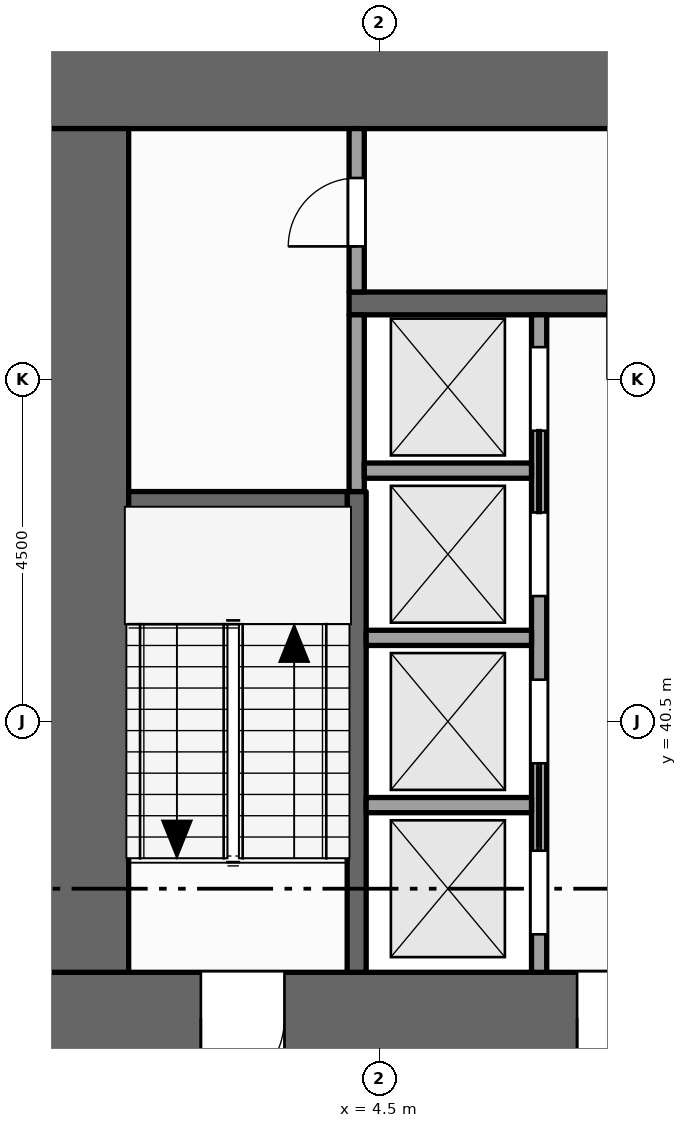
"""IFC4 building model, lengths in metres.
Left out: names, types, materials, properties, quantities, classifications, styles, units other than length and angle.
Written with IfcOpenShell. Run it as: python <this file> out.ifc"""

import sys

from ifc_helpers import new_model, si_unit, direction, frame, frame_2d, origin, place, context, subcontext, project, spatial, rectangle, extrude, element, fill, save


model = new_model("IFC4")
c1 = context("Model", 3, precision=1e-05, world=origin(), true_north=direction((0.0, 1.0)))
c2 = subcontext(c1, "Body", "Model", "MODEL_VIEW")
j1 = project(units=[si_unit("LENGTHUNIT", "METRE"), si_unit("PLANEANGLEUNIT", "RADIAN")], contexts=[c1])
p1 = place(None, origin())
s1 = spatial("IfcSite", under=j1, at=p1, CompositionType="ELEMENT")
p2 = place(p1, origin())
s2 = spatial("IfcBuilding", under=s1, at=p2, CompositionType="ELEMENT")
p3 = place(p2, frame((0.0, 0.0, 41.0)))
s3 = spatial("IfcBuildingStorey", under=s2, at=p3, CompositionType="ELEMENT", Elevation=41.0)
p4 = place(p3, frame((0.0, 36.6, -0.15), z_axis=(0.0, 0.0, 1.0), x_axis=(1.0, 0.0, 0.0)))
e1 = element("IfcWall", 1, at=p4, inside=s3, PredefinedType="SHEAR", context=c2, shape_type="SweptSolid", body=[
    extrude(rectangle(XDim=22.5, YDim=1.2, at=frame_2d((11.25, 0.0))), origin(), (0.0, 0.0, 1.0), 4.0),
])
p5 = place(p4, frame((7.1, 0.0, 0.15)))
e2 = element("IfcOpeningElement", 2, at=p5, cuts=e1, PredefinedType="OPENING", context=c2, shape_type="SweptSolid", body=[
    extrude(rectangle(XDim=1.8, YDim=2.1, at=frame_2d((0.9, 1.05))), frame((0.0, 0.61, 0.0), z_axis=(0.0, -1.0, 0.0), x_axis=(1.0, 0.0, 0.0)), (0.0, 0.0, 1.0), 1.22),
])
p6 = place(p4, frame((13.15, 0.0, 0.15)))
e3 = element("IfcOpeningElement", 3, at=p6, cuts=e1, PredefinedType="OPENING", context=c2, shape_type="SweptSolid", body=[
    extrude(rectangle(XDim=1.1, YDim=2.1, at=frame_2d((0.55, 1.05))), frame((0.0, 0.61, 0.0), z_axis=(0.0, -1.0, 0.0), x_axis=(1.0, 0.0, 0.0)), (0.0, 0.0, 1.0), 1.22),
])
p7 = place(p4, frame((2.15, 0.0, 0.15)))
e4 = element("IfcOpeningElement", 4, at=p7, cuts=e1, PredefinedType="OPENING", context=c2, shape_type="SweptSolid", body=[
    extrude(rectangle(XDim=1.1, YDim=2.1, at=frame_2d((0.55, 1.05))), frame((0.0, 0.61, 0.0), z_axis=(0.0, -1.0, 0.0), x_axis=(1.0, 0.0, 0.0)), (0.0, 0.0, 1.0), 1.22),
])
p8 = place(p4, frame((19.35, 0.0, 0.15)))
e5 = element("IfcOpeningElement", 5, at=p8, cuts=e1, PredefinedType="OPENING", context=c2, shape_type="SweptSolid", body=[
    extrude(rectangle(XDim=1.1, YDim=2.1, at=frame_2d((0.55, 1.05))), frame((0.0, 0.61, 0.0), z_axis=(0.0, -1.0, 0.0), x_axis=(1.0, 0.0, 0.0)), (0.0, 0.0, 1.0), 1.22),
])
p9 = place(p3, frame((0.0, 48.9, -0.15), z_axis=(0.0, 0.0, 1.0), x_axis=(1.0, 0.0, 0.0)))
e6 = element("IfcWall", 6, at=p9, inside=s3, PredefinedType="SHEAR", context=c2, shape_type="SweptSolid", body=[
    extrude(rectangle(XDim=22.5, YDim=1.2, at=frame_2d((11.25, 0.0))), origin(), (0.0, 0.0, 1.0), 4.0),
])
p10 = place(p3, frame((0.6, 37.2, -0.15), z_axis=(0.0, 0.0, 1.0), x_axis=(0.0, 1.0, 0.0)))
e7 = element("IfcWall", 7, at=p10, inside=s3, PredefinedType="SHEAR", context=c2, shape_type="SweptSolid", body=[
    extrude(rectangle(XDim=11.1, YDim=1.2, at=frame_2d((5.55, 0.0))), origin(), (0.0, 0.0, 1.0), 4.0),
])
p11 = place(p3, frame((4.2, 37.2, 0.0), z_axis=(0.0, 0.0, 1.0), x_axis=(0.0, 1.0, 0.0)))
e8 = element("IfcWall", 8, at=p11, inside=s3, PredefinedType="SHEAR", context=c2, shape_type="SweptSolid", body=[
    extrude(rectangle(XDim=6.325, YDim=0.25, at=frame_2d((3.163, 0.0))), origin(), (0.0, 0.0, 1.0), 3.85),
])
p12 = place(p3, frame((4.2, 43.525, 0.0), z_axis=(0.0, 0.0, 1.0), x_axis=(0.0, 1.0, 0.0)))
e9 = element("IfcWall", 9, at=p12, inside=s3, PredefinedType="SOLIDWALL", context=c2, shape_type="SweptSolid", body=[
    extrude(rectangle(XDim=2.325, YDim=0.2, at=frame_2d((1.163, 0.0))), origin(), (0.0, 0.0, 1.0), 3.85),
])
p13 = place(p3, frame((4.2, 46.15, 0.0), z_axis=(0.0, 0.0, 1.0), x_axis=(0.0, 1.0, 0.0)))
e10 = element("IfcWall", 10, at=p13, inside=s3, PredefinedType="PARTITIONING", context=c2, shape_type="SweptSolid", body=[
    extrude(rectangle(XDim=2.15, YDim=0.2, at=frame_2d((1.075, 0.0))), origin(), (0.0, 0.0, 1.0), 3.85),
])
p14 = place(p13, frame((0.6, 0.0, 0.0)))
e11 = element("IfcOpeningElement", 11, at=p14, cuts=e10, PredefinedType="OPENING", context=c2, shape_type="SweptSolid", body=[
    extrude(rectangle(XDim=0.9, YDim=2.1, at=frame_2d((0.45, 1.05))), frame((0.0, 0.11, 0.0), z_axis=(0.0, -1.0, 0.0), x_axis=(1.0, 0.0, 0.0)), (0.0, 0.0, 1.0), 0.22),
])
p15 = place(p3, frame((6.6, 37.2, 0.0), z_axis=(0.0, 0.0, 1.0), x_axis=(0.0, 1.0, 0.0)))
e12 = element("IfcWall", 12, at=p15, inside=s3, PredefinedType="SOLIDWALL", context=c2, shape_type="SweptSolid", body=[
    extrude(rectangle(XDim=8.65, YDim=0.2, at=frame_2d((4.325, 0.0))), origin(), (0.0, 0.0, 1.0), 3.85),
])
p16 = place(p15, frame((0.5, 0.0, 0.012)))
e13 = element("IfcOpeningElement", 13, at=p16, cuts=e12, PredefinedType="OPENING", context=c2, shape_type="SweptSolid", body=[
    extrude(rectangle(XDim=1.1, YDim=2.1, at=frame_2d((0.55, 1.05))), frame((0.0, 0.11, 0.0), z_axis=(0.0, -1.0, 0.0), x_axis=(1.0, 0.0, 0.0)), (0.0, 0.0, 1.0), 0.22),
])
p17 = place(p15, frame((2.75, 0.0, 0.012)))
e14 = element("IfcOpeningElement", 14, at=p17, cuts=e12, PredefinedType="OPENING", context=c2, shape_type="SweptSolid", body=[
    extrude(rectangle(XDim=1.1, YDim=2.1, at=frame_2d((0.55, 1.05))), frame((0.0, 0.11, 0.0), z_axis=(0.0, -1.0, 0.0), x_axis=(1.0, 0.0, 0.0)), (0.0, 0.0, 1.0), 0.22),
])
p18 = place(p15, frame((4.95, 0.0, 0.012)))
e15 = element("IfcOpeningElement", 15, at=p18, cuts=e12, PredefinedType="OPENING", context=c2, shape_type="SweptSolid", body=[
    extrude(rectangle(XDim=1.1, YDim=2.1, at=frame_2d((0.55, 1.05))), frame((0.0, 0.11, 0.0), z_axis=(0.0, -1.0, 0.0), x_axis=(1.0, 0.0, 0.0)), (0.0, 0.0, 1.0), 0.22),
])
p19 = place(p15, frame((7.125, 0.0, 0.012)))
e16 = element("IfcOpeningElement", 16, at=p19, cuts=e12, PredefinedType="OPENING", context=c2, shape_type="SweptSolid", body=[
    extrude(rectangle(XDim=1.1, YDim=2.1, at=frame_2d((0.55, 1.05))), frame((0.0, 0.11, 0.0), z_axis=(0.0, -1.0, 0.0), x_axis=(1.0, 0.0, 0.0)), (0.0, 0.0, 1.0), 0.22),
])
for number, where, z_axis, x_axis in (
    (17, (4.325, 39.4, 0.0), (0.0, 0.0, 1.0), (1.0, 0.0, 0.0)),
    (18, (4.325, 41.6, 0.0), (0.0, 0.0, 1.0), (1.0, 0.0, 0.0)),
):
    element("IfcWall", number, at=place(p3, frame(where, z_axis=z_axis, x_axis=x_axis)), inside=s3, PredefinedType="SOLIDWALL", context=c2, shape_type="SweptSolid", body=[
        extrude(rectangle(XDim=2.175, YDim=0.2, at=frame_2d((1.087, 0.0))), origin(), (0.0, 0.0, 1.0), 3.85),
    ])
p20 = place(p3, frame((1.2, 43.4, 0.0), z_axis=(0.0, 0.0, 1.0), x_axis=(1.0, 0.0, 0.0)))
e19 = element("IfcWall", 19, at=p20, inside=s3, PredefinedType="SHEAR", context=c2, shape_type="SweptSolid", body=[
    extrude(rectangle(XDim=2.875, YDim=0.25, at=frame_2d((1.438, 0.0))), origin(), (0.0, 0.0, 1.0), 3.85),
])
p21 = place(p3, frame((4.3, 43.8, 0.0), z_axis=(0.0, 0.0, 1.0), x_axis=(1.0, 0.0, 0.0)))
e20 = element("IfcWall", 20, at=p21, inside=s3, PredefinedType="SOLIDWALL", context=c2, shape_type="SweptSolid", body=[
    extrude(rectangle(XDim=2.2, YDim=0.2, at=frame_2d((1.1, 0.0))), origin(), (0.0, 0.0, 1.0), 3.85),
])
p22 = place(p3, frame((4.1, 46.0, 0.0), z_axis=(0.0, 0.0, 1.0), x_axis=(1.0, 0.0, 0.0)))
e21 = element("IfcWall", 21, at=p22, inside=s3, PredefinedType="SHEAR", context=c2, shape_type="SweptSolid", body=[
    extrude(rectangle(XDim=14.5, YDim=0.3, at=frame_2d((7.25, 0.0))), origin(), (0.0, 0.0, 1.0), 3.85),
])
p23 = place(p22, frame((3.4, 0.0, 0.0)))
e22 = element("IfcOpeningElement", 22, at=p23, cuts=e21, PredefinedType="OPENING", context=c2, shape_type="SweptSolid", body=[
    extrude(rectangle(XDim=1.0, YDim=2.1, at=frame_2d((0.5, 1.05))), frame((0.0, 0.16, 0.0), z_axis=(0.0, -1.0, 0.0), x_axis=(1.0, 0.0, 0.0)), (0.0, 0.0, 1.0), 0.32),
])
p24 = place(p22, frame((9.1, 0.0, 0.0)))
e23 = element("IfcOpeningElement", 23, at=p24, cuts=e21, PredefinedType="OPENING", context=c2, shape_type="SweptSolid", body=[
    extrude(rectangle(XDim=1.0, YDim=2.1, at=frame_2d((0.5, 1.05))), frame((0.0, 0.16, 0.0), z_axis=(0.0, -1.0, 0.0), x_axis=(1.0, 0.0, 0.0)), (0.0, 0.0, 1.0), 0.32),
])
p25 = place(p16, origin())
e24 = element("IfcDoor", 24, at=p25, inside=s3, OperationType="SLIDING_TO_RIGHT", PredefinedType="DOOR", context=c2, shape_type="SweptSolid", body=[
    extrude(rectangle(XDim=1.1, YDim=2.1, at=frame_2d((0.55, 1.05))), frame((0.0, 0.025, 0.0), z_axis=(0.0, -1.0, 0.0), x_axis=(1.0, 0.0, 0.0)), (0.0, 0.0, 1.0), 0.05),
])
fill(e13, e24)
p26 = place(p17, origin())
e25 = element("IfcDoor", 25, at=p26, inside=s3, OperationType="SLIDING_TO_LEFT", PredefinedType="DOOR", context=c2, shape_type="SweptSolid", body=[
    extrude(rectangle(XDim=1.1, YDim=2.1, at=frame_2d((0.55, 1.05))), frame((0.0, 0.025, 0.0), z_axis=(0.0, -1.0, 0.0), x_axis=(1.0, 0.0, 0.0)), (0.0, 0.0, 1.0), 0.05),
])
fill(e14, e25)
p27 = place(p18, origin())
e26 = element("IfcDoor", 26, at=p27, inside=s3, OperationType="SLIDING_TO_RIGHT", PredefinedType="DOOR", context=c2, shape_type="SweptSolid", body=[
    extrude(rectangle(XDim=1.1, YDim=2.1, at=frame_2d((0.55, 1.05))), frame((0.0, 0.025, 0.0), z_axis=(0.0, -1.0, 0.0), x_axis=(1.0, 0.0, 0.0)), (0.0, 0.0, 1.0), 0.05),
])
fill(e15, e26)
p28 = place(p19, origin())
e27 = element("IfcDoor", 27, at=p28, inside=s3, OperationType="SLIDING_TO_LEFT", PredefinedType="DOOR", context=c2, shape_type="SweptSolid", body=[
    extrude(rectangle(XDim=1.1, YDim=2.1, at=frame_2d((0.55, 1.05))), frame((0.0, 0.025, 0.0), z_axis=(0.0, -1.0, 0.0), x_axis=(1.0, 0.0, 0.0)), (0.0, 0.0, 1.0), 0.05),
])
fill(e16, e27)
p29 = place(p5, origin())
e28 = element("IfcDoor", 28, at=p29, inside=s3, OperationType="DOUBLE_DOOR_SINGLE_SWING", PredefinedType="DOOR", context=c2, shape_type="SweptSolid", body=[
    extrude(rectangle(XDim=1.8, YDim=2.1, at=frame_2d((0.9, 1.05))), frame((0.0, 0.025, 0.0), z_axis=(0.0, -1.0, 0.0), x_axis=(1.0, 0.0, 0.0)), (0.0, 0.0, 1.0), 0.05),
])
fill(e2, e28)
p30 = place(p7, origin())
e29 = element("IfcDoor", 29, at=p30, inside=s3, OperationType="SINGLE_SWING_LEFT", PredefinedType="DOOR", context=c2, shape_type="SweptSolid", body=[
    extrude(rectangle(XDim=1.1, YDim=2.1, at=frame_2d((0.55, 1.05))), frame((0.0, 0.025, 0.0), z_axis=(0.0, -1.0, 0.0), x_axis=(1.0, 0.0, 0.0)), (0.0, 0.0, 1.0), 0.05),
])
fill(e4, e29)
p31 = place(p14, origin())
e30 = element("IfcDoor", 30, at=p31, inside=s3, OperationType="SINGLE_SWING_LEFT", PredefinedType="DOOR", context=c2, shape_type="SweptSolid", body=[
    extrude(rectangle(XDim=0.9, YDim=2.1, at=frame_2d((0.45, 1.05))), frame((0.0, 0.025, 0.0), z_axis=(0.0, -1.0, 0.0), x_axis=(1.0, 0.0, 0.0)), (0.0, 0.0, 1.0), 0.05),
])
fill(e11, e30)
save(model, sys.argv[1])
